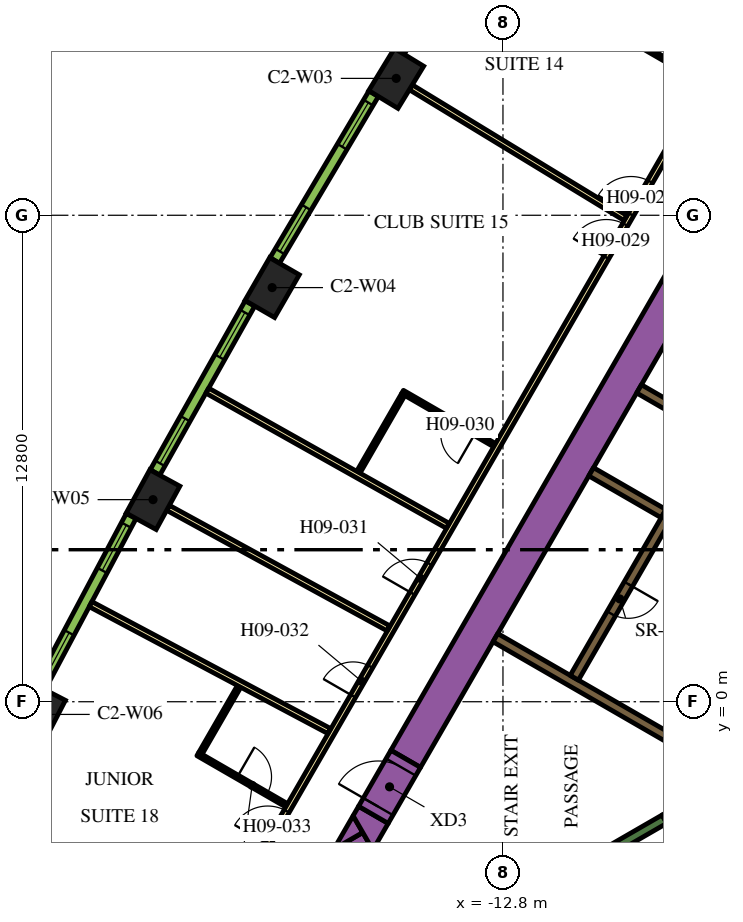
"""IFC4 building model, lengths in metres.
Left out: names, types, materials, properties, quantities, classifications, styles, units other than length and angle.
Written with IfcOpenShell. Run it as: python <this file> out.ifc"""

import sys

from ifc_helpers import new_model, si_unit, direction, frame, frame_2d, origin, origin_2d, place, context, subcontext, project, spatial, polyline, rectangle, outline, extrude, element, fill, save


model = new_model("IFC4")
c1 = context("Model", 3, precision=1e-05, world=origin(), true_north=direction((0.0, 1.0)))
c2 = subcontext(c1, "Body", "Model", "MODEL_VIEW")
j1 = project(units=[si_unit("LENGTHUNIT", "METRE"), si_unit("PLANEANGLEUNIT", "RADIAN")], contexts=[c1])
p1 = place(None, origin())
s1 = spatial("IfcSite", under=j1, at=p1, CompositionType="ELEMENT")
p2 = place(p1, origin())
s2 = spatial("IfcBuilding", under=s1, at=p2, CompositionType="ELEMENT")
p3 = place(p2, frame((0.0, 0.0, 118.8)))
s3 = spatial("IfcBuildingStorey", under=s2, at=p3, CompositionType="ELEMENT", Elevation=118.8)
for number, where, z_axis, x_axis in (
    (1, (-15.609, 16.402, 0.0), (0.0, 0.0, 1.0), (-0.52, -0.854, 0.0)),
    (2, (-18.874, 10.897, 0.0), (0.0, 0.0, 1.0), (-0.5, -0.866, 0.0)),
    (3, (-22.009, 5.317, 0.0), (0.0, 0.0, 1.0), (-0.48, -0.877, 0.0)),
    (4, (-25.012, -0.334, 0.0), (0.0, 0.0, 1.0), (-0.459, -0.888, 0.0)),
):
    element("IfcColumn", number, at=place(p3, frame(where, z_axis=z_axis, x_axis=x_axis)), inside=s3, PredefinedType="COLUMN", context=c2, shape_type="SweptSolid", body=[
        extrude(rectangle(XDim=1.3, YDim=0.9, at=origin_2d()), origin(), (0.0, 0.0, 1.0), 3.9),
    ])
p4 = place(p3, frame((-15.36, -1.503, 0.0), z_axis=(0.0, 0.0, 1.0), x_axis=(0.50000389221, 0.866023156604, 0.0)))
e5 = element("IfcWall", 5, at=p4, inside=s3, PredefinedType="SOLIDWALL", context=c2, shape_type="SweptSolid", body=[
    extrude(rectangle(XDim=21.0, YDim=0.9, at=frame_2d((10.5, 0.0))), origin(), (0.0, 0.0, 1.0), 3.9),
])
p5 = place(p3, frame((-12.134, -11.883, 0.0), z_axis=(0.0, 0.0, 1.0), x_axis=(-0.500005339912, 0.866022320763, 0.0)))
e6 = element("IfcWall", 6, at=p5, inside=s3, PredefinedType="SOLIDWALL", context=c2, shape_type="SweptSolid", body=[
    extrude(rectangle(XDim=9.488, YDim=0.9, at=frame_2d((4.744, 0.0))), origin(), (0.0, 0.0, 1.0), 3.9),
])
p6 = place(p3, origin())
e7 = element("IfcWall", 7, at=p6, inside=s3, PredefinedType="SOLIDWALL", context=c2, shape_type="SweptSolid", body=[
    extrude(outline(polyline([(-16.489, -3.44), (-17.251, -3.88), (-16.743, -3.0), (-16.489, -3.44)])), origin(), (0.0, 0.0, 1.0), 3.9),
])
e8 = element("IfcWall", 8, at=p6, inside=s3, PredefinedType="SOLIDWALL", context=c2, shape_type="SweptSolid", body=[
    extrude(outline(polyline([(-15.82, -3.201), (-16.223, -3.9), (-16.743, -3.0), (-16.599, -2.751), (-15.82, -3.201)])), origin(), (0.0, 0.0, 1.0), 3.9),
])
p7 = place(p3, frame((-14.44, -6.49, 0.0), z_axis=(0.0, 0.0, 1.0), x_axis=(0.866022966069, 0.500004222222, 0.0)))
e9 = element("IfcWall", 9, at=p7, inside=s3, PredefinedType="SOLIDWALL", context=c2, shape_type="SweptSolid", body=[
    extrude(rectangle(XDim=6.8, YDim=0.25, at=frame_2d((3.4, 0.0))), origin(), (0.0, 0.0, 1.0), 3.9),
])
p8 = place(p3, frame((-8.168, -3.503, 0.0), z_axis=(0.0, 0.0, 1.0), x_axis=(-0.499952099219, 0.866053057547, 0.0)))
e10 = element("IfcWall", 10, at=p8, inside=s3, PredefinedType="SOLIDWALL", context=c2, shape_type="SweptSolid", body=[
    extrude(rectangle(XDim=0.675, YDim=0.25, at=frame_2d((0.337, 0.0))), origin(), (0.0, 0.0, 1.0), 3.9),
])
p9 = place(p3, frame((-8.106, -1.14, 0.0), z_axis=(0.0, 0.0, 1.0), x_axis=(-0.866000643155, 0.500042884217, 0.0)))
e11 = element("IfcWall", 11, at=p9, inside=s3, PredefinedType="SOLIDWALL", context=c2, shape_type="SweptSolid", body=[
    extrude(rectangle(XDim=5.65, YDim=0.25, at=frame_2d((2.825, 0.0))), origin(), (0.0, 0.0, 1.0), 3.9),
])
for number, where, z_axis, x_axis in (
    (12, (-8.574, 4.95, 0.0), (0.0, 0.0, 1.0), (-0.866, 0.5, 0.0)),
    (13, (-7.314, 7.132, 0.0), (0.0, 0.0, 1.0), (-0.866, 0.5, 0.0)),
):
    element("IfcWall", number, at=place(p3, frame(where, z_axis=z_axis, x_axis=x_axis)), inside=s3, PredefinedType="SOLIDWALL", context=c2, shape_type="SweptSolid", body=[
        extrude(rectangle(XDim=2.2, YDim=0.25, at=frame_2d((1.1, 0.0))), origin(), (0.0, 0.0, 1.0), 3.9),
    ])
p10 = place(p3, frame((-6.008, 9.144, 0.0), z_axis=(0.0, 0.0, 1.0), x_axis=(-0.500006956611, -0.866021387346, 0.0)))
e14 = element("IfcWall", 14, at=p10, inside=s3, PredefinedType="SOLIDWALL", context=c2, shape_type="SweptSolid", body=[
    extrude(rectangle(XDim=9.83, YDim=0.25, at=frame_2d((4.915, 0.0))), origin(), (0.0, 0.0, 1.0), 3.9),
])
p11 = place(p10, frame((6.985, 0.0, 0.0)))
e15 = element("IfcOpeningElement", 15, at=p11, cuts=e14, PredefinedType="OPENING", context=c2, shape_type="SweptSolid", body=[
    extrude(rectangle(XDim=0.9, YDim=2.1, at=frame_2d((0.45, 1.05))), frame((0.0, 0.135, 0.0), z_axis=(0.0, -1.0, 0.0), x_axis=(1.0, 0.0, 0.0)), (0.0, 0.0, 1.0), 0.27),
])
p12 = place(p3, frame((-16.209, -2.976, 0.0), z_axis=(0.0, 0.0, 1.0), x_axis=(0.499954529098, 0.86605165483, 0.0)))
e16 = element("IfcWall", 16, at=p12, inside=s3, PredefinedType="SOLIDWALL", context=c2, shape_type="SweptSolid", body=[
    extrude(rectangle(XDim=1.7, YDim=0.9, at=frame_2d((0.85, 0.0))), origin(), (0.0, 0.0, 1.0), 3.9),
])
p13 = place(p12, frame((0.25, 0.0, 0.0)))
e17 = element("IfcOpeningElement", 17, at=p13, cuts=e16, PredefinedType="OPENING", context=c2, shape_type="SweptSolid", body=[
    extrude(rectangle(XDim=1.2, YDim=2.1, at=frame_2d((0.6, 1.05))), frame((0.0, 0.46, 0.0), z_axis=(0.0, -1.0, 0.0), x_axis=(1.0, 0.0, 0.0)), (0.0, 0.0, 1.0), 0.92),
])
p14 = place(p3, frame((-19.081, -3.9, 0.0), z_axis=(0.0, 0.0, 1.0), x_axis=(0.499998313975, 0.866026377209, 0.0)))
e18 = element("IfcWall", 18, at=p14, inside=s3, PredefinedType="PARTITIONING", context=c2, shape_type="SweptSolid", body=[
    extrude(rectangle(XDim=25.766, YDim=0.15, at=frame_2d((12.883, 0.0))), origin(), (0.0, 0.0, 1.0), 2.75),
])
p15 = place(p14, frame((19.306, 0.0, 0.0)))
e19 = element("IfcOpeningElement", 19, at=p15, cuts=e18, PredefinedType="OPENING", context=c2, shape_type="SweptSolid", body=[
    extrude(rectangle(XDim=1.0, YDim=2.1, at=frame_2d((0.5, 1.05))), frame((0.0, 0.085, 0.0), z_axis=(0.0, -1.0, 0.0), x_axis=(1.0, 0.0, 0.0)), (0.0, 0.0, 1.0), 0.17),
])
p16 = place(p14, frame((18.0, 0.0, 0.0)))
e20 = element("IfcOpeningElement", 20, at=p16, cuts=e18, PredefinedType="OPENING", context=c2, shape_type="SweptSolid", body=[
    extrude(rectangle(XDim=1.0, YDim=2.1, at=frame_2d((0.5, 1.05))), frame((0.0, 0.085, 0.0), z_axis=(0.0, -1.0, 0.0), x_axis=(1.0, 0.0, 0.0)), (0.0, 0.0, 1.0), 0.17),
])
p17 = place(p14, frame((7.793, 0.0, 0.0)))
e21 = element("IfcOpeningElement", 21, at=p17, cuts=e18, PredefinedType="OPENING", context=c2, shape_type="SweptSolid", body=[
    extrude(rectangle(XDim=0.9, YDim=2.1, at=frame_2d((0.45, 1.05))), frame((0.0, 0.085, 0.0), z_axis=(0.0, -1.0, 0.0), x_axis=(1.0, 0.0, 0.0)), (0.0, 0.0, 1.0), 0.17),
])
p18 = place(p14, frame((4.674, 0.0, 0.0)))
e22 = element("IfcOpeningElement", 22, at=p18, cuts=e18, PredefinedType="OPENING", context=c2, shape_type="SweptSolid", body=[
    extrude(rectangle(XDim=0.9, YDim=2.1, at=frame_2d((0.45, 1.05))), frame((0.0, 0.085, 0.0), z_axis=(0.0, -1.0, 0.0), x_axis=(1.0, 0.0, 0.0)), (0.0, 0.0, 1.0), 0.17),
])
p19 = place(p14, frame((0.18, 0.0, 0.0)))
e23 = element("IfcOpeningElement", 23, at=p19, cuts=e18, PredefinedType="OPENING", context=c2, shape_type="SweptSolid", body=[
    extrude(rectangle(XDim=1.0, YDim=2.1, at=frame_2d((0.5, 1.05))), frame((0.0, 0.085, 0.0), z_axis=(0.0, -1.0, 0.0), x_axis=(1.0, 0.0, 0.0)), (0.0, 0.0, 1.0), 0.17),
])
p20 = place(p3, frame((-23.652, 2.567, 0.0), z_axis=(0.0, 0.0, 1.0), x_axis=(0.883019237957, -0.469336793144, 0.0)))
e24 = element("IfcWall", 24, at=p20, inside=s3, PredefinedType="PARTITIONING", context=c2, shape_type="SweptSolid", body=[
    extrude(rectangle(XDim=7.111, YDim=0.15, at=frame_2d((3.555, 0.0))), origin(), (0.0, 0.0, 1.0), 2.75),
])
p21 = place(p3, frame((-26.591, -3.122, 0.0), z_axis=(0.0, 0.0, 1.0), x_axis=(0.893766213273, -0.448533115847, 0.0)))
e25 = element("IfcWall", 25, at=p21, inside=s3, PredefinedType="PARTITIONING", context=c2, shape_type="SweptSolid", body=[
    extrude(rectangle(XDim=10.875, YDim=0.15, at=frame_2d((5.438, 0.0))), origin(), (0.0, 0.0, 1.0), 2.75),
])
p22 = place(p3, frame((-21.614, 5.102, 0.0), z_axis=(0.0, 0.0, 1.0), x_axis=(0.877484555087, -0.479604895287, 0.0)))
e26 = element("IfcWall", 26, at=p22, inside=s3, PredefinedType="PARTITIONING", context=c2, shape_type="SweptSolid", body=[
    extrude(rectangle(XDim=6.611, YDim=0.15, at=frame_2d((3.306, 0.0))), origin(), (0.0, 0.0, 1.0), 2.75),
])
p23 = place(p3, frame((-20.581, 8.185, 0.0), z_axis=(0.0, 0.0, 1.0), x_axis=(0.871820720803, -0.489825102233, 0.0)))
e27 = element("IfcWall", 27, at=p23, inside=s3, PredefinedType="PARTITIONING", context=c2, shape_type="SweptSolid", body=[
    extrude(rectangle(XDim=7.257, YDim=0.15, at=frame_2d((3.628, 0.0))), origin(), (0.0, 0.0, 1.0), 2.75),
])
p24 = place(p3, frame((-15.225, 16.167, 0.0), z_axis=(0.0, 0.0, 1.0), x_axis=(0.854088713274, -0.520127359266, 0.0)))
e28 = element("IfcWall", 28, at=p24, inside=s3, PredefinedType="PARTITIONING", context=c2, shape_type="SweptSolid", body=[
    extrude(rectangle(XDim=6.611, YDim=0.15, at=frame_2d((3.305, 0.0))), origin(), (0.0, 0.0, 1.0), 2.75),
])
p25 = place(p3, frame((-9.928, 17.704, 0.0), z_axis=(0.0, 0.0, 1.0), x_axis=(0.866034573852, -0.49998411664, 0.0)))
e29 = element("IfcWall", 29, at=p25, inside=s3, PredefinedType="PARTITIONING", context=c2, shape_type="SweptSolid", body=[
    extrude(rectangle(XDim=2.8, YDim=0.1, at=frame_2d((1.4, 0.0))), origin(), (0.0, 0.0, 1.0), 2.75),
])
p26 = place(p25, frame((1.3, 0.0, 0.0)))
e30 = element("IfcOpeningElement", 30, at=p26, cuts=e29, PredefinedType="OPENING", context=c2, shape_type="SweptSolid", body=[
    extrude(rectangle(XDim=0.9, YDim=2.1, at=frame_2d((0.45, 1.05))), frame((0.0, 0.06, 0.0), z_axis=(0.0, -1.0, 0.0), x_axis=(1.0, 0.0, 0.0)), (0.0, 0.0, 1.0), 0.12),
])
p27 = place(p3, frame((-13.019, 6.751, 0.0), z_axis=(0.0, 0.0, 1.0), x_axis=(-0.866034573852, 0.49998411664, 0.0)))
e31 = element("IfcWall", 31, at=p27, inside=s3, PredefinedType="PARTITIONING", context=c2, shape_type="SweptSolid", body=[
    extrude(rectangle(XDim=2.8, YDim=0.1, at=frame_2d((1.4, 0.0))), origin(), (0.0, 0.0, 1.0), 2.75),
])
p28 = place(p27, frame((0.6, 0.0, 0.0)))
e32 = element("IfcOpeningElement", 32, at=p28, cuts=e31, PredefinedType="OPENING", context=c2, shape_type="SweptSolid", body=[
    extrude(rectangle(XDim=0.9, YDim=2.1, at=frame_2d((0.45, 1.05))), frame((0.0, 0.06, 0.0), z_axis=(0.0, -1.0, 0.0), x_axis=(1.0, 0.0, 0.0)), (0.0, 0.0, 1.0), 0.12),
])
p29 = place(p3, frame((-15.425, 8.083, 0.0), z_axis=(0.0, 0.0, 1.0), x_axis=(-0.500032858622, -0.866006432019, 0.0)))
e33 = element("IfcWall", 33, at=p29, inside=s3, PredefinedType="PARTITIONING", context=c2, shape_type="SweptSolid", body=[
    extrude(rectangle(XDim=2.36, YDim=0.1, at=frame_2d((1.18, 0.0))), origin(), (0.0, 0.0, 1.0), 2.75),
])
p30 = place(p3, frame((-20.829, -1.377, 0.0), z_axis=(0.0, 0.0, 1.0), x_axis=(0.866036505625, -0.499980770555, 0.0)))
e34 = element("IfcWall", 34, at=p30, inside=s3, PredefinedType="PARTITIONING", context=c2, shape_type="SweptSolid", body=[
    extrude(rectangle(XDim=2.7, YDim=0.1, at=frame_2d((1.35, 0.0))), origin(), (0.0, 0.0, 1.0), 2.75),
])
p31 = place(p30, frame((1.2, 0.0, 0.0)))
e35 = element("IfcOpeningElement", 35, at=p31, cuts=e34, PredefinedType="OPENING", context=c2, shape_type="SweptSolid", body=[
    extrude(rectangle(XDim=0.9, YDim=2.1, at=frame_2d((0.45, 1.05))), frame((0.0, 0.06, 0.0), z_axis=(0.0, -1.0, 0.0), x_axis=(1.0, 0.0, 0.0)), (0.0, 0.0, 1.0), 0.12),
])
p32 = place(p3, frame((-20.761, -1.359, 0.0), z_axis=(0.0, 0.0, 1.0), x_axis=(0.499954962928, 0.866051404389, 0.0)))
e36 = element("IfcWall", 36, at=p32, inside=s3, PredefinedType="PARTITIONING", context=c2, shape_type="SweptSolid", body=[
    extrude(rectangle(XDim=2.03, YDim=0.1, at=frame_2d((1.015, 0.0))), origin(), (0.0, 0.0, 1.0), 2.75),
])
p33 = place(p3, frame((-12.82, 21.439, 0.0), z_axis=(0.0, 0.0, 1.0), x_axis=(-0.530072082134, -0.847952585787, 0.0)))
e37 = element("IfcWall", 37, at=p33, inside=s3, PredefinedType="SOLIDWALL", context=c2, shape_type="SweptSolid", body=[
    extrude(rectangle(XDim=5.1, YDim=0.29, at=frame_2d((2.55, 0.0))), origin(), (0.0, 0.0, 1.0), 3.65),
])
p34 = place(p33, frame((0.273, 0.0, 0.9)))
e38 = element("IfcOpeningElement", 38, at=p34, cuts=e37, PredefinedType="OPENING", context=c2, shape_type="SweptSolid", body=[
    extrude(rectangle(XDim=1.35, YDim=2.15, at=frame_2d((0.675, 1.075))), frame((0.0, 0.155, 0.0), z_axis=(0.0, -1.0, 0.0), x_axis=(1.0, 0.0, 0.0)), (0.0, 0.0, 1.0), 0.31),
])
p35 = place(p33, frame((3.478, 0.0, 0.9)))
e39 = element("IfcOpeningElement", 39, at=p35, cuts=e37, PredefinedType="OPENING", context=c2, shape_type="SweptSolid", body=[
    extrude(rectangle(XDim=1.35, YDim=2.15, at=frame_2d((0.675, 1.075))), frame((0.0, 0.155, 0.0), z_axis=(0.0, -1.0, 0.0), x_axis=(1.0, 0.0, 0.0)), (0.0, 0.0, 1.0), 0.31),
])
p36 = place(p3, frame((-16.203, 15.998, 0.0), z_axis=(0.0, 0.0, 1.0), x_axis=(-0.510054281659, -0.860142214847, 0.0)))
e40 = element("IfcWall", 40, at=p36, inside=s3, PredefinedType="SOLIDWALL", context=c2, shape_type="SweptSolid", body=[
    extrude(rectangle(XDim=5.101, YDim=0.29, at=frame_2d((2.55, 0.0))), origin(), (0.0, 0.0, 1.0), 3.65),
])
p37 = place(p36, frame((0.273, 0.0, 0.9)))
e41 = element("IfcOpeningElement", 41, at=p37, cuts=e40, PredefinedType="OPENING", context=c2, shape_type="SweptSolid", body=[
    extrude(rectangle(XDim=1.35, YDim=2.15, at=frame_2d((0.675, 1.075))), frame((0.0, 0.155, 0.0), z_axis=(0.0, -1.0, 0.0), x_axis=(1.0, 0.0, 0.0)), (0.0, 0.0, 1.0), 0.31),
])
p38 = place(p36, frame((3.478, 0.0, 0.9)))
e42 = element("IfcOpeningElement", 42, at=p38, cuts=e40, PredefinedType="OPENING", context=c2, shape_type="SweptSolid", body=[
    extrude(rectangle(XDim=1.35, YDim=2.15, at=frame_2d((0.675, 1.075))), frame((0.0, 0.155, 0.0), z_axis=(0.0, -1.0, 0.0), x_axis=(1.0, 0.0, 0.0)), (0.0, 0.0, 1.0), 0.31),
])
p39 = place(p3, frame((-19.458, 10.48, 0.0), z_axis=(0.0, 0.0, 1.0), x_axis=(-0.48983164787, -0.87181704316, 0.0)))
e43 = element("IfcWall", 43, at=p39, inside=s3, PredefinedType="SOLIDWALL", context=c2, shape_type="SweptSolid", body=[
    extrude(rectangle(XDim=5.1, YDim=0.29, at=frame_2d((2.55, 0.0))), origin(), (0.0, 0.0, 1.0), 3.65),
])
p40 = place(p39, frame((0.272, 0.0, 0.9)))
e44 = element("IfcOpeningElement", 44, at=p40, cuts=e43, PredefinedType="OPENING", context=c2, shape_type="SweptSolid", body=[
    extrude(rectangle(XDim=1.35, YDim=2.15, at=frame_2d((0.675, 1.075))), frame((0.0, 0.155, 0.0), z_axis=(0.0, -1.0, 0.0), x_axis=(1.0, 0.0, 0.0)), (0.0, 0.0, 1.0), 0.31),
])
p41 = place(p39, frame((3.478, 0.0, 0.9)))
e45 = element("IfcOpeningElement", 45, at=p41, cuts=e43, PredefinedType="OPENING", context=c2, shape_type="SweptSolid", body=[
    extrude(rectangle(XDim=1.35, YDim=2.15, at=frame_2d((0.675, 1.075))), frame((0.0, 0.155, 0.0), z_axis=(0.0, -1.0, 0.0), x_axis=(1.0, 0.0, 0.0)), (0.0, 0.0, 1.0), 0.31),
])
p42 = place(p3, frame((-22.583, 4.887, 0.0), z_axis=(0.0, 0.0, 1.0), x_axis=(-0.469323203119, -0.883026461106, 0.0)))
e46 = element("IfcWall", 46, at=p42, inside=s3, PredefinedType="SOLIDWALL", context=c2, shape_type="SweptSolid", body=[
    extrude(rectangle(XDim=5.101, YDim=0.29, at=frame_2d((2.55, 0.0))), origin(), (0.0, 0.0, 1.0), 3.65),
])
p43 = place(p42, frame((0.273, 0.0, 0.9)))
e47 = element("IfcOpeningElement", 47, at=p43, cuts=e46, PredefinedType="OPENING", context=c2, shape_type="SweptSolid", body=[
    extrude(rectangle(XDim=1.35, YDim=2.15, at=frame_2d((0.675, 1.075))), frame((0.0, 0.155, 0.0), z_axis=(0.0, -1.0, 0.0), x_axis=(1.0, 0.0, 0.0)), (0.0, 0.0, 1.0), 0.31),
])
p44 = place(p42, frame((3.478, 0.0, 0.9)))
e48 = element("IfcOpeningElement", 48, at=p44, cuts=e46, PredefinedType="OPENING", context=c2, shape_type="SweptSolid", body=[
    extrude(rectangle(XDim=1.35, YDim=2.15, at=frame_2d((0.675, 1.075))), frame((0.0, 0.155, 0.0), z_axis=(0.0, -1.0, 0.0), x_axis=(1.0, 0.0, 0.0)), (0.0, 0.0, 1.0), 0.31),
])
p45 = place(p11, origin())
e49 = element("IfcDoor", 49, at=p45, inside=s3, OperationType="SINGLE_SWING_LEFT", PredefinedType="DOOR", context=c2, shape_type="SweptSolid", body=[
    extrude(rectangle(XDim=0.9, YDim=2.1, at=frame_2d((0.45, 1.05))), frame((0.0, 0.025, 0.0), z_axis=(0.0, -1.0, 0.0), x_axis=(1.0, 0.0, 0.0)), (0.0, 0.0, 1.0), 0.05),
])
fill(e15, e49)
p46 = place(p13, origin())
e50 = element("IfcDoor", 50, at=p46, inside=s3, OperationType="SINGLE_SWING_LEFT", PredefinedType="DOOR", context=c2, shape_type="SweptSolid", body=[
    extrude(rectangle(XDim=1.2, YDim=2.1, at=frame_2d((0.6, 1.05))), frame((0.0, 0.025, 0.0), z_axis=(0.0, -1.0, 0.0), x_axis=(1.0, 0.0, 0.0)), (0.0, 0.0, 1.0), 0.05),
])
fill(e17, e50)
p47 = place(p15, origin())
e51 = element("IfcDoor", 51, at=p47, inside=s3, OperationType="SINGLE_SWING_LEFT", PredefinedType="DOOR", context=c2, shape_type="SweptSolid", body=[
    extrude(rectangle(XDim=1.0, YDim=2.1, at=frame_2d((0.5, 1.05))), frame((0.0, 0.025, 0.0), z_axis=(0.0, -1.0, 0.0), x_axis=(1.0, 0.0, 0.0)), (0.0, 0.0, 1.0), 0.05),
])
fill(e19, e51)
p48 = place(p26, origin())
e52 = element("IfcDoor", 52, at=p48, inside=s3, OperationType="SINGLE_SWING_LEFT", PredefinedType="DOOR", context=c2, shape_type="SweptSolid", body=[
    extrude(rectangle(XDim=0.9, YDim=2.1, at=frame_2d((0.45, 1.05))), frame((0.0, 0.025, 0.0), z_axis=(0.0, -1.0, 0.0), x_axis=(1.0, 0.0, 0.0)), (0.0, 0.0, 1.0), 0.05),
])
fill(e30, e52)
p49 = place(p16, origin())
e53 = element("IfcDoor", 53, at=p49, inside=s3, OperationType="SINGLE_SWING_RIGHT", PredefinedType="DOOR", context=c2, shape_type="SweptSolid", body=[
    extrude(rectangle(XDim=1.0, YDim=2.1, at=frame_2d((0.5, 1.05))), frame((0.0, 0.025, 0.0), z_axis=(0.0, -1.0, 0.0), x_axis=(1.0, 0.0, 0.0)), (0.0, 0.0, 1.0), 0.05),
])
fill(e20, e53)
p50 = place(p28, origin())
e54 = element("IfcDoor", 54, at=p50, inside=s3, OperationType="SINGLE_SWING_RIGHT", PredefinedType="DOOR", context=c2, shape_type="SweptSolid", body=[
    extrude(rectangle(XDim=0.9, YDim=2.1, at=frame_2d((0.45, 1.05))), frame((0.0, 0.025, 0.0), z_axis=(0.0, -1.0, 0.0), x_axis=(1.0, 0.0, 0.0)), (0.0, 0.0, 1.0), 0.05),
])
fill(e32, e54)
p51 = place(p17, origin())
e55 = element("IfcDoor", 55, at=p51, inside=s3, OperationType="SINGLE_SWING_RIGHT", PredefinedType="DOOR", context=c2, shape_type="SweptSolid", body=[
    extrude(rectangle(XDim=0.9, YDim=2.1, at=frame_2d((0.45, 1.05))), frame((0.0, 0.025, 0.0), z_axis=(0.0, -1.0, 0.0), x_axis=(1.0, 0.0, 0.0)), (0.0, 0.0, 1.0), 0.05),
])
fill(e21, e55)
p52 = place(p18, origin())
e56 = element("IfcDoor", 56, at=p52, inside=s3, OperationType="SINGLE_SWING_LEFT", PredefinedType="DOOR", context=c2, shape_type="SweptSolid", body=[
    extrude(rectangle(XDim=0.9, YDim=2.1, at=frame_2d((0.45, 1.05))), frame((0.0, 0.025, 0.0), z_axis=(0.0, -1.0, 0.0), x_axis=(1.0, 0.0, 0.0)), (0.0, 0.0, 1.0), 0.05),
])
fill(e22, e56)
p53 = place(p19, origin())
e57 = element("IfcDoor", 57, at=p53, inside=s3, OperationType="SINGLE_SWING_LEFT", PredefinedType="DOOR", context=c2, shape_type="SweptSolid", body=[
    extrude(rectangle(XDim=1.0, YDim=2.1, at=frame_2d((0.5, 1.05))), frame((0.0, 0.025, 0.0), z_axis=(0.0, -1.0, 0.0), x_axis=(1.0, 0.0, 0.0)), (0.0, 0.0, 1.0), 0.05),
])
fill(e23, e57)
p54 = place(p31, origin())
e58 = element("IfcDoor", 58, at=p54, inside=s3, OperationType="SINGLE_SWING_RIGHT", PredefinedType="DOOR", context=c2, shape_type="SweptSolid", body=[
    extrude(rectangle(XDim=0.9, YDim=2.1, at=frame_2d((0.45, 1.05))), frame((0.0, 0.025, 0.0), z_axis=(0.0, -1.0, 0.0), x_axis=(1.0, 0.0, 0.0)), (0.0, 0.0, 1.0), 0.05),
])
fill(e35, e58)
p55 = place(p37, origin())
e59 = element("IfcWindow", 59, at=p55, inside=s3, PartitioningType="DOUBLE_PANEL_VERTICAL", PredefinedType="WINDOW", context=c2, shape_type="SweptSolid", body=[
    extrude(rectangle(XDim=1.35, YDim=2.15, at=frame_2d((0.675, 1.075))), frame((0.0, 0.015, 0.0), z_axis=(0.0, -1.0, 0.0), x_axis=(1.0, 0.0, 0.0)), (0.0, 0.0, 1.0), 0.06),
])
fill(e41, e59)
p56 = place(p38, origin())
e60 = element("IfcWindow", 60, at=p56, inside=s3, PartitioningType="DOUBLE_PANEL_VERTICAL", PredefinedType="WINDOW", context=c2, shape_type="SweptSolid", body=[
    extrude(rectangle(XDim=1.35, YDim=2.15, at=frame_2d((0.675, 1.075))), frame((0.0, 0.015, 0.0), z_axis=(0.0, -1.0, 0.0), x_axis=(1.0, 0.0, 0.0)), (0.0, 0.0, 1.0), 0.06),
])
fill(e42, e60)
p57 = place(p40, origin())
e61 = element("IfcWindow", 61, at=p57, inside=s3, PartitioningType="DOUBLE_PANEL_VERTICAL", PredefinedType="WINDOW", context=c2, shape_type="SweptSolid", body=[
    extrude(rectangle(XDim=1.35, YDim=2.15, at=frame_2d((0.675, 1.075))), frame((0.0, 0.015, 0.0), z_axis=(0.0, -1.0, 0.0), x_axis=(1.0, 0.0, 0.0)), (0.0, 0.0, 1.0), 0.06),
])
fill(e44, e61)
p58 = place(p41, origin())
e62 = element("IfcWindow", 62, at=p58, inside=s3, PartitioningType="DOUBLE_PANEL_VERTICAL", PredefinedType="WINDOW", context=c2, shape_type="SweptSolid", body=[
    extrude(rectangle(XDim=1.35, YDim=2.15, at=frame_2d((0.675, 1.075))), frame((0.0, 0.015, 0.0), z_axis=(0.0, -1.0, 0.0), x_axis=(1.0, 0.0, 0.0)), (0.0, 0.0, 1.0), 0.06),
])
fill(e45, e62)
p59 = place(p43, origin())
e63 = element("IfcWindow", 63, at=p59, inside=s3, PartitioningType="DOUBLE_PANEL_VERTICAL", PredefinedType="WINDOW", context=c2, shape_type="SweptSolid", body=[
    extrude(rectangle(XDim=1.35, YDim=2.15, at=frame_2d((0.675, 1.075))), frame((0.0, 0.015, 0.0), z_axis=(0.0, -1.0, 0.0), x_axis=(1.0, 0.0, 0.0)), (0.0, 0.0, 1.0), 0.06),
])
fill(e47, e63)
p60 = place(p44, origin())
e64 = element("IfcWindow", 64, at=p60, inside=s3, PartitioningType="DOUBLE_PANEL_VERTICAL", PredefinedType="WINDOW", context=c2, shape_type="SweptSolid", body=[
    extrude(rectangle(XDim=1.35, YDim=2.15, at=frame_2d((0.675, 1.075))), frame((0.0, 0.015, 0.0), z_axis=(0.0, -1.0, 0.0), x_axis=(1.0, 0.0, 0.0)), (0.0, 0.0, 1.0), 0.06),
])
fill(e48, e64)
save(model, sys.argv[1])
